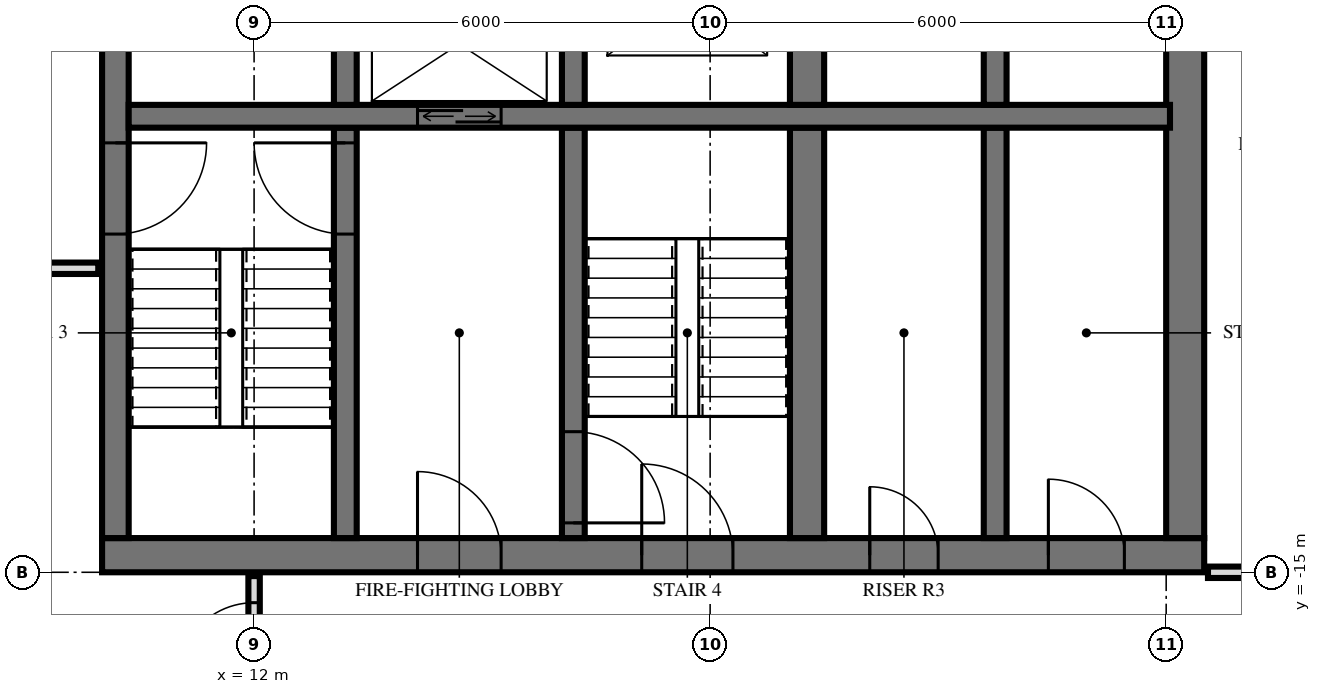
"""IFC4 building model, lengths in metres.
Left out: names, types, materials, properties, quantities, classifications, styles, units other than length and angle.
Written with IfcOpenShell. Run it as: python <this file> out.ifc"""

import sys

from ifc_helpers import new_model, si_unit, direction, frame, frame_2d, origin, place, context, subcontext, project, spatial, rectangle, extrude, element, fill, save


model = new_model("IFC4")
c1 = context("Model", 3, precision=1e-05, world=origin(), true_north=direction((0.0, 1.0)))
c2 = subcontext(c1, "Body", "Model", "MODEL_VIEW")
j1 = project(units=[si_unit("LENGTHUNIT", "METRE"), si_unit("PLANEANGLEUNIT", "RADIAN")], contexts=[c1])
p1 = place(None, origin())
s1 = spatial("IfcSite", under=j1, at=p1, CompositionType="ELEMENT")
p2 = place(p1, origin())
s2 = spatial("IfcBuilding", under=s1, at=p2, CompositionType="ELEMENT")
p3 = place(p2, frame((0.0, 0.0, 120.0)))
s3 = spatial("IfcBuildingStorey", under=s2, at=p3, CompositionType="ELEMENT", Elevation=120.0)
p4 = place(p3, frame((10.0, -14.775, 0.0), z_axis=(0.0, 0.0, 1.0), x_axis=(1.0, 0.0, 0.0)))
e1 = element("IfcWall", 1, at=p4, inside=s3, PredefinedType="SHEAR", context=c2, shape_type="SweptSolid", body=[
    extrude(rectangle(XDim=14.5, YDim=0.45, at=frame_2d((7.25, 0.0))), origin(), (0.0, 0.0, 1.0), 3.6),
])
p5 = place(p4, frame((7.1, 0.0, 0.0)))
e2 = element("IfcOpeningElement", 2, at=p5, cuts=e1, PredefinedType="OPENING", context=c2, shape_type="SweptSolid", body=[
    extrude(rectangle(XDim=1.2, YDim=2.1, at=frame_2d((0.6, 1.05))), frame((0.0, 0.235, 0.0), z_axis=(0.0, -1.0, 0.0), x_axis=(1.0, 0.0, 0.0)), (0.0, 0.0, 1.0), 0.47),
])
p6 = place(p4, frame((4.15, 0.0, 0.0)))
e3 = element("IfcOpeningElement", 3, at=p6, cuts=e1, PredefinedType="OPENING", context=c2, shape_type="SweptSolid", body=[
    extrude(rectangle(XDim=1.1, YDim=2.1, at=frame_2d((0.55, 1.05))), frame((0.0, 0.235, 0.0), z_axis=(0.0, -1.0, 0.0), x_axis=(1.0, 0.0, 0.0)), (0.0, 0.0, 1.0), 0.47),
])
p7 = place(p4, frame((10.1, 0.0, 0.0)))
e4 = element("IfcOpeningElement", 4, at=p7, cuts=e1, PredefinedType="OPENING", context=c2, shape_type="SweptSolid", body=[
    extrude(rectangle(XDim=0.9, YDim=2.1, at=frame_2d((0.45, 1.05))), frame((0.0, 0.235, 0.0), z_axis=(0.0, -1.0, 0.0), x_axis=(1.0, 0.0, 0.0)), (0.0, 0.0, 1.0), 0.47),
])
p8 = place(p4, frame((12.45, 0.0, 0.0)))
e5 = element("IfcOpeningElement", 5, at=p8, cuts=e1, PredefinedType="OPENING", context=c2, shape_type="SweptSolid", body=[
    extrude(rectangle(XDim=1.0, YDim=2.1, at=frame_2d((0.5, 1.05))), frame((0.0, 0.235, 0.0), z_axis=(0.0, -1.0, 0.0), x_axis=(1.0, 0.0, 0.0)), (0.0, 0.0, 1.0), 0.47),
])
p9 = place(p3, frame((10.175, -14.55, 0.0), z_axis=(0.0, 0.0, 1.0), x_axis=(0.0, 1.0, 0.0)))
e6 = element("IfcWall", 6, at=p9, inside=s3, PredefinedType="SHEAR", context=c2, shape_type="SweptSolid", body=[
    extrude(rectangle(XDim=14.1, YDim=0.35, at=frame_2d((7.05, 0.0))), origin(), (0.0, 0.0, 1.0), 3.6),
])
p10 = place(p9, frame((8.4, 0.0, 0.0)))
e7 = element("IfcOpeningElement", 7, at=p10, cuts=e6, PredefinedType="OPENING", context=c2, shape_type="SweptSolid", body=[
    extrude(rectangle(XDim=1.4, YDim=2.4, at=frame_2d((0.7, 1.2))), frame((0.0, 0.185, 0.0), z_axis=(0.0, -1.0, 0.0), x_axis=(1.0, 0.0, 0.0)), (0.0, 0.0, 1.0), 0.37),
])
p11 = place(p9, frame((10.0, 0.0, 0.0)))
e8 = element("IfcOpeningElement", 8, at=p11, cuts=e6, PredefinedType="OPENING", context=c2, shape_type="SweptSolid", body=[
    extrude(rectangle(XDim=1.4, YDim=2.4, at=frame_2d((0.7, 1.2))), frame((0.0, 0.185, 0.0), z_axis=(0.0, -1.0, 0.0), x_axis=(1.0, 0.0, 0.0)), (0.0, 0.0, 1.0), 0.37),
])
p12 = place(p9, frame((4.0, 0.0, 0.0)))
e9 = element("IfcOpeningElement", 9, at=p12, cuts=e6, PredefinedType="OPENING", context=c2, shape_type="SweptSolid", body=[
    extrude(rectangle(XDim=1.2, YDim=2.1, at=frame_2d((0.6, 1.05))), frame((0.0, 0.185, 0.0), z_axis=(0.0, -1.0, 0.0), x_axis=(1.0, 0.0, 0.0)), (0.0, 0.0, 1.0), 0.37),
])
p13 = place(p3, frame((24.25, -14.55, 0.0), z_axis=(0.0, 0.0, 1.0), x_axis=(0.0, 1.0, 0.0)))
e10 = element("IfcWall", 10, at=p13, inside=s3, PredefinedType="SHEAR", context=c2, shape_type="SweptSolid", body=[
    extrude(rectangle(XDim=14.1, YDim=0.5, at=frame_2d((7.05, 0.0))), origin(), (0.0, 0.0, 1.0), 3.6),
])
p14 = place(p3, frame((10.35, -9.0, 0.0), z_axis=(0.0, 0.0, 1.0), x_axis=(1.0, 0.0, 0.0)))
e11 = element("IfcWall", 11, at=p14, inside=s3, PredefinedType="SHEAR", context=c2, shape_type="SweptSolid", body=[
    extrude(rectangle(XDim=13.7, YDim=0.3, at=frame_2d((6.85, 0.0))), origin(), (0.0, 0.0, 1.0), 3.6),
])
p15 = place(p14, frame((3.8, 0.0, 0.0)))
e12 = element("IfcOpeningElement", 12, at=p15, cuts=e11, PredefinedType="OPENING", context=c2, shape_type="SweptSolid", body=[
    extrude(rectangle(XDim=1.1, YDim=2.1, at=frame_2d((0.55, 1.05))), frame((0.0, 0.16, 0.0), z_axis=(0.0, -1.0, 0.0), x_axis=(1.0, 0.0, 0.0)), (0.0, 0.0, 1.0), 0.32),
])
p16 = place(p3, frame((13.2, -8.85, 0.0), z_axis=(0.0, 0.0, 1.0), x_axis=(0.0, 1.0, 0.0)))
e13 = element("IfcWall", 13, at=p16, inside=s3, PredefinedType="SHEAR", context=c2, shape_type="SweptSolid", body=[
    extrude(rectangle(XDim=2.3, YDim=0.3, at=frame_2d((1.15, 0.0))), origin(), (0.0, 0.0, 1.0), 3.6),
])
p17 = place(p3, frame((13.2, -14.55, 0.0), z_axis=(0.0, 0.0, 1.0), x_axis=(0.0, 1.0, 0.0)))
e14 = element("IfcWall", 14, at=p17, inside=s3, PredefinedType="SHEAR", context=c2, shape_type="SweptSolid", body=[
    extrude(rectangle(XDim=5.4, YDim=0.3, at=frame_2d((2.7, 0.0))), origin(), (0.0, 0.0, 1.0), 3.6),
])
p18 = place(p17, frame((4.0, 0.0, 0.0)))
e15 = element("IfcOpeningElement", 15, at=p18, cuts=e14, PredefinedType="OPENING", context=c2, shape_type="SweptSolid", body=[
    extrude(rectangle(XDim=1.2, YDim=2.1, at=frame_2d((0.6, 1.05))), frame((0.0, 0.16, 0.0), z_axis=(0.0, -1.0, 0.0), x_axis=(1.0, 0.0, 0.0)), (0.0, 0.0, 1.0), 0.32),
])
p19 = place(p3, frame((16.2, -8.85, 0.0), z_axis=(0.0, 0.0, 1.0), x_axis=(0.0, 1.0, 0.0)))
e16 = element("IfcWall", 16, at=p19, inside=s3, PredefinedType="SHEAR", context=c2, shape_type="SweptSolid", body=[
    extrude(rectangle(XDim=2.3, YDim=0.3, at=frame_2d((1.15, 0.0))), origin(), (0.0, 0.0, 1.0), 3.6),
])
p20 = place(p3, frame((16.2, -14.55, 0.0), z_axis=(0.0, 0.0, 1.0), x_axis=(0.0, 1.0, 0.0)))
e17 = element("IfcWall", 17, at=p20, inside=s3, PredefinedType="SHEAR", context=c2, shape_type="SweptSolid", body=[
    extrude(rectangle(XDim=5.4, YDim=0.3, at=frame_2d((2.7, 0.0))), origin(), (0.0, 0.0, 1.0), 3.6),
])
p21 = place(p20, frame((0.2, 0.0, 0.0)))
e18 = element("IfcOpeningElement", 18, at=p21, cuts=e17, PredefinedType="OPENING", context=c2, shape_type="SweptSolid", body=[
    extrude(rectangle(XDim=1.2, YDim=2.1, at=frame_2d((0.6, 1.05))), frame((0.0, 0.16, 0.0), z_axis=(0.0, -1.0, 0.0), x_axis=(1.0, 0.0, 0.0)), (0.0, 0.0, 1.0), 0.32),
])
p22 = place(p3, frame((19.275, -8.85, 0.0), z_axis=(0.0, 0.0, 1.0), x_axis=(0.0, 1.0, 0.0)))
e19 = element("IfcWall", 19, at=p22, inside=s3, PredefinedType="SHEAR", context=c2, shape_type="SweptSolid", body=[
    extrude(rectangle(XDim=2.3, YDim=0.45, at=frame_2d((1.15, 0.0))), origin(), (0.0, 0.0, 1.0), 3.6),
])
p23 = place(p3, frame((19.275, -14.55, 0.0), z_axis=(0.0, 0.0, 1.0), x_axis=(0.0, 1.0, 0.0)))
e20 = element("IfcWall", 20, at=p23, inside=s3, PredefinedType="SHEAR", context=c2, shape_type="SweptSolid", body=[
    extrude(rectangle(XDim=5.4, YDim=0.45, at=frame_2d((2.7, 0.0))), origin(), (0.0, 0.0, 1.0), 3.6),
])
p24 = place(p3, frame((21.75, -8.85, 0.0), z_axis=(0.0, 0.0, 1.0), x_axis=(0.0, 1.0, 0.0)))
e21 = element("IfcWall", 21, at=p24, inside=s3, PredefinedType="SHEAR", context=c2, shape_type="SweptSolid", body=[
    extrude(rectangle(XDim=2.3, YDim=0.3, at=frame_2d((1.15, 0.0))), origin(), (0.0, 0.0, 1.0), 3.6),
])
p25 = place(p3, frame((21.75, -14.55, 0.0), z_axis=(0.0, 0.0, 1.0), x_axis=(0.0, 1.0, 0.0)))
e22 = element("IfcWall", 22, at=p25, inside=s3, PredefinedType="SHEAR", context=c2, shape_type="SweptSolid", body=[
    extrude(rectangle(XDim=5.4, YDim=0.3, at=frame_2d((2.7, 0.0))), origin(), (0.0, 0.0, 1.0), 3.6),
])
p26 = place(p3, frame((12.0, -16.8, 0.0), z_axis=(0.0, 0.0, 1.0), x_axis=(0.0, 1.0, 0.0)))
e23 = element("IfcWall", 23, at=p26, inside=s3, PredefinedType="PARTITIONING", context=c2, shape_type="SweptSolid", body=[
    extrude(rectangle(XDim=1.75, YDim=0.15, at=frame_2d((0.875, 0.0))), origin(), (0.0, 0.0, 1.0), 3.32),
])
p27 = place(p26, frame((0.4, 0.0, 0.0)))
e24 = element("IfcOpeningElement", 24, at=p27, cuts=e23, PredefinedType="OPENING", context=c2, shape_type="SweptSolid", body=[
    extrude(rectangle(XDim=1.0, YDim=2.1, at=frame_2d((0.5, 1.05))), frame((0.0, 0.085, 0.0), z_axis=(0.0, -1.0, 0.0), x_axis=(1.0, 0.0, 0.0)), (0.0, 0.0, 1.0), 0.17),
])
p28 = place(p3, frame((24.55, -15.0, 0.0), z_axis=(0.0, 0.0, 1.0), x_axis=(1.0, 0.0, 0.0)))
e25 = element("IfcWall", 25, at=p28, inside=s3, PredefinedType="PARTITIONING", context=c2, shape_type="SweptSolid", body=[
    extrude(rectangle(XDim=3.47, YDim=0.15, at=frame_2d((1.735, 0.0))), origin(), (0.0, 0.0, 1.0), 3.32),
])
p29 = place(p28, frame((0.9, 0.0, 0.0)))
e26 = element("IfcOpeningElement", 26, at=p29, cuts=e25, PredefinedType="OPENING", context=c2, shape_type="SweptSolid", body=[
    extrude(rectangle(XDim=1.0, YDim=2.1, at=frame_2d((0.5, 1.05))), frame((0.0, 0.085, 0.0), z_axis=(0.0, -1.0, 0.0), x_axis=(1.0, 0.0, 0.0)), (0.0, 0.0, 1.0), 0.17),
])
p30 = place(p3, frame((-9.95, -11.0, 0.0), z_axis=(0.0, 0.0, 1.0), x_axis=(1.0, 0.0, 0.0)))
e27 = element("IfcWall", 27, at=p30, inside=s3, PredefinedType="PARTITIONING", context=c2, shape_type="SweptSolid", body=[
    extrude(rectangle(XDim=19.9, YDim=0.15, at=frame_2d((9.95, 0.0))), origin(), (0.0, 0.0, 1.0), 3.32),
])
p31 = place(p30, frame((9.45, 0.0, 0.0)))
e28 = element("IfcOpeningElement", 28, at=p31, cuts=e27, PredefinedType="OPENING", context=c2, shape_type="SweptSolid", body=[
    extrude(rectangle(XDim=1.0, YDim=2.1, at=frame_2d((0.5, 1.05))), frame((0.0, 0.085, 0.0), z_axis=(0.0, -1.0, 0.0), x_axis=(1.0, 0.0, 0.0)), (0.0, 0.0, 1.0), 0.17),
])
p32 = place(p30, frame((15.45, 0.0, 0.0)))
e29 = element("IfcOpeningElement", 29, at=p32, cuts=e27, PredefinedType="OPENING", context=c2, shape_type="SweptSolid", body=[
    extrude(rectangle(XDim=1.0, YDim=2.1, at=frame_2d((0.5, 1.05))), frame((0.0, 0.085, 0.0), z_axis=(0.0, -1.0, 0.0), x_axis=(1.0, 0.0, 0.0)), (0.0, 0.0, 1.0), 0.17),
])
p33 = place(p15, origin())
e30 = element("IfcDoor", 30, at=p33, inside=s3, OperationType="DOUBLE_DOOR_SLIDING", PredefinedType="USERDEFINED", context=c2, shape_type="SweptSolid", body=[
    extrude(rectangle(XDim=1.1, YDim=2.1, at=frame_2d((0.55, 1.05))), frame((0.0, 0.025, 0.0), z_axis=(0.0, -1.0, 0.0), x_axis=(1.0, 0.0, 0.0)), (0.0, 0.0, 1.0), 0.05),
])
fill(e12, e30)
p34 = place(p12, frame((0.6, 0.0, 0.0), z_axis=(0.0, 0.0, 1.0), x_axis=(-1.0, 0.0, 0.0)))
e31 = element("IfcDoor", 31, at=p34, inside=s3, OperationType="SINGLE_SWING_RIGHT", PredefinedType="DOOR", context=c2, shape_type="SweptSolid", body=[
    extrude(rectangle(XDim=1.2, YDim=2.1, at=frame_2d((0.0, 1.05))), frame((0.0, -0.025, 0.0), z_axis=(0.0, 1.0, 0.0), x_axis=(-1.0, 0.0, 0.0)), (0.0, 0.0, 1.0), 0.05),
])
fill(e9, e31)
p35 = place(p5, origin())
e32 = element("IfcDoor", 32, at=p35, inside=s3, OperationType="SINGLE_SWING_RIGHT", PredefinedType="DOOR", context=c2, shape_type="SweptSolid", body=[
    extrude(rectangle(XDim=1.2, YDim=2.1, at=frame_2d((0.6, 1.05))), frame((0.0, 0.025, 0.0), z_axis=(0.0, -1.0, 0.0), x_axis=(1.0, 0.0, 0.0)), (0.0, 0.0, 1.0), 0.05),
])
fill(e2, e32)
p36 = place(p6, origin())
e33 = element("IfcDoor", 33, at=p36, inside=s3, OperationType="SINGLE_SWING_RIGHT", PredefinedType="DOOR", context=c2, shape_type="SweptSolid", body=[
    extrude(rectangle(XDim=1.1, YDim=2.1, at=frame_2d((0.55, 1.05))), frame((0.0, 0.025, 0.0), z_axis=(0.0, -1.0, 0.0), x_axis=(1.0, 0.0, 0.0)), (0.0, 0.0, 1.0), 0.05),
])
fill(e3, e33)
p37 = place(p7, origin())
e34 = element("IfcDoor", 34, at=p37, inside=s3, OperationType="SINGLE_SWING_RIGHT", PredefinedType="DOOR", context=c2, shape_type="SweptSolid", body=[
    extrude(rectangle(XDim=0.9, YDim=2.1, at=frame_2d((0.45, 1.05))), frame((0.0, 0.025, 0.0), z_axis=(0.0, -1.0, 0.0), x_axis=(1.0, 0.0, 0.0)), (0.0, 0.0, 1.0), 0.05),
])
fill(e4, e34)
p38 = place(p8, origin())
e35 = element("IfcDoor", 35, at=p38, inside=s3, OperationType="SINGLE_SWING_RIGHT", PredefinedType="DOOR", context=c2, shape_type="SweptSolid", body=[
    extrude(rectangle(XDim=1.0, YDim=2.1, at=frame_2d((0.5, 1.05))), frame((0.0, 0.025, 0.0), z_axis=(0.0, -1.0, 0.0), x_axis=(1.0, 0.0, 0.0)), (0.0, 0.0, 1.0), 0.05),
])
fill(e5, e35)
p39 = place(p18, origin())
e36 = element("IfcDoor", 36, at=p39, inside=s3, OperationType="SINGLE_SWING_LEFT", PredefinedType="DOOR", context=c2, shape_type="SweptSolid", body=[
    extrude(rectangle(XDim=1.2, YDim=2.1, at=frame_2d((0.6, 1.05))), frame((0.0, 0.025, 0.0), z_axis=(0.0, -1.0, 0.0), x_axis=(1.0, 0.0, 0.0)), (0.0, 0.0, 1.0), 0.05),
])
fill(e15, e36)
p40 = place(p21, frame((0.6, 0.0, 0.0), z_axis=(0.0, 0.0, 1.0), x_axis=(-1.0, 0.0, 0.0)))
e37 = element("IfcDoor", 37, at=p40, inside=s3, OperationType="SINGLE_SWING_LEFT", PredefinedType="DOOR", context=c2, shape_type="SweptSolid", body=[
    extrude(rectangle(XDim=1.2, YDim=2.1, at=frame_2d((0.0, 1.05))), frame((0.0, -0.025, 0.0), z_axis=(0.0, 1.0, 0.0), x_axis=(-1.0, 0.0, 0.0)), (0.0, 0.0, 1.0), 0.05),
])
fill(e18, e37)
p41 = place(p27, origin())
e38 = element("IfcDoor", 38, at=p41, inside=s3, OperationType="SINGLE_SWING_RIGHT", PredefinedType="DOOR", context=c2, shape_type="SweptSolid", body=[
    extrude(rectangle(XDim=1.0, YDim=2.1, at=frame_2d((0.5, 1.05))), frame((0.0, 0.025, 0.0), z_axis=(0.0, -1.0, 0.0), x_axis=(1.0, 0.0, 0.0)), (0.0, 0.0, 1.0), 0.05),
])
fill(e24, e38)
save(model, sys.argv[1])
